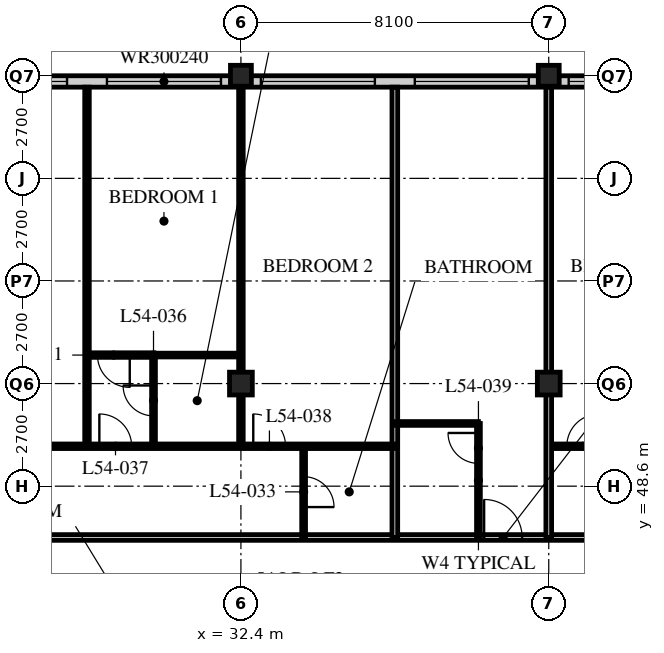
"""IFC4 building model, lengths in metres.
Left out: names, types, materials, properties, quantities, classifications, styles, units other than length and angle.
Written with IfcOpenShell. Run it as: python <this file> out.ifc"""

import sys

from ifc_helpers import new_model, si_unit, direction, frame, frame_2d, origin, origin_2d, place, context, subcontext, project, spatial, rectangle, hollow_rectangle, extrude, element, fill, save


model = new_model("IFC4")
c1 = context("Model", 3, precision=1e-05, world=origin(), true_north=direction((0.0, 1.0)))
c2 = subcontext(c1, "Body", "Model", "MODEL_VIEW")
j1 = project(units=[si_unit("LENGTHUNIT", "METRE"), si_unit("PLANEANGLEUNIT", "RADIAN")], contexts=[c1])
p1 = place(None, origin())
s1 = spatial("IfcSite", under=j1, at=p1, CompositionType="ELEMENT")
p2 = place(p1, origin())
s2 = spatial("IfcBuilding", under=s1, at=p2, CompositionType="ELEMENT")
p3 = place(p2, frame((0.0, 0.0, 210.0)))
s3 = spatial("IfcBuildingStorey", under=s2, at=p3, CompositionType="ELEMENT", Elevation=210.0)
p4 = place(p3, frame((32.4, 51.3, 0.0), z_axis=(0.0, 0.0, 1.0), x_axis=(1.0, 0.0, 0.0)))
e1 = element("IfcColumn", 1, at=p4, inside=s3, PredefinedType="COLUMN", context=c2, shape_type="SweptSolid", body=[
    extrude(hollow_rectangle(XDim=0.6, YDim=0.6, WallThickness=0.05, at=origin_2d()), origin(), (0.0, 0.0, 1.0), 3.6),
])
p5 = place(p3, frame((32.4, 59.4, 0.0), z_axis=(0.0, 0.0, 1.0), x_axis=(1.0, 0.0, 0.0)))
e2 = element("IfcColumn", 2, at=p5, inside=s3, PredefinedType="COLUMN", context=c2, shape_type="SweptSolid", body=[
    extrude(hollow_rectangle(XDim=0.55, YDim=0.55, WallThickness=0.045, at=origin_2d()), origin(), (0.0, 0.0, 1.0), 3.6),
])
p6 = place(p3, frame((40.5, 51.3, 0.0), z_axis=(0.0, 0.0, 1.0), x_axis=(1.0, 0.0, 0.0)))
e3 = element("IfcColumn", 3, at=p6, inside=s3, PredefinedType="COLUMN", context=c2, shape_type="SweptSolid", body=[
    extrude(hollow_rectangle(XDim=0.6, YDim=0.6, WallThickness=0.05, at=origin_2d()), origin(), (0.0, 0.0, 1.0), 3.6),
])
p7 = place(p3, frame((40.5, 59.4, 0.0), z_axis=(0.0, 0.0, 1.0), x_axis=(1.0, 0.0, 0.0)))
e4 = element("IfcColumn", 4, at=p7, inside=s3, PredefinedType="COLUMN", context=c2, shape_type="SweptSolid", body=[
    extrude(hollow_rectangle(XDim=0.55, YDim=0.55, WallThickness=0.045, at=origin_2d()), origin(), (0.0, 0.0, 1.0), 3.6),
])
p8 = place(p3, frame((48.3, 59.25, 0.0), z_axis=(0.0, 0.0, 1.0), x_axis=(-1.0, 0.0, 0.0)))
e5 = element("IfcWall", 5, at=p8, inside=s3, PredefinedType="SOLIDWALL", context=c2, shape_type="SweptSolid", body=[
    extrude(rectangle(XDim=40.2, YDim=0.3, at=frame_2d((20.1, 0.0))), origin(), (0.0, 0.0, 1.0), 3.39),
])
p9 = place(p8, frame((0.225, 0.0, 0.6)))
e6 = element("IfcOpeningElement", 6, at=p9, cuts=e5, PredefinedType="OPENING", context=c2, shape_type="SweptSolid", body=[
    extrude(rectangle(XDim=3.0, YDim=2.4, at=frame_2d((1.5, 1.2))), frame((0.0, 0.16, 0.0), z_axis=(0.0, -1.0, 0.0), x_axis=(1.0, 0.0, 0.0)), (0.0, 0.0, 1.0), 0.32),
])
p10 = place(p8, frame((4.275, 0.0, 0.6)))
e7 = element("IfcOpeningElement", 7, at=p10, cuts=e5, PredefinedType="OPENING", context=c2, shape_type="SweptSolid", body=[
    extrude(rectangle(XDim=3.0, YDim=2.4, at=frame_2d((1.5, 1.2))), frame((0.0, 0.16, 0.0), z_axis=(0.0, -1.0, 0.0), x_axis=(1.0, 0.0, 0.0)), (0.0, 0.0, 1.0), 0.32),
])
p11 = place(p8, frame((8.325, 0.0, 0.6)))
e8 = element("IfcOpeningElement", 8, at=p11, cuts=e5, PredefinedType="OPENING", context=c2, shape_type="SweptSolid", body=[
    extrude(rectangle(XDim=3.0, YDim=2.4, at=frame_2d((1.5, 1.2))), frame((0.0, 0.16, 0.0), z_axis=(0.0, -1.0, 0.0), x_axis=(1.0, 0.0, 0.0)), (0.0, 0.0, 1.0), 0.32),
])
p12 = place(p8, frame((12.375, 0.0, 0.6)))
e9 = element("IfcOpeningElement", 9, at=p12, cuts=e5, PredefinedType="OPENING", context=c2, shape_type="SweptSolid", body=[
    extrude(rectangle(XDim=3.0, YDim=2.4, at=frame_2d((1.5, 1.2))), frame((0.0, 0.16, 0.0), z_axis=(0.0, -1.0, 0.0), x_axis=(1.0, 0.0, 0.0)), (0.0, 0.0, 1.0), 0.32),
])
p13 = place(p8, frame((16.425, 0.0, 0.6)))
e10 = element("IfcOpeningElement", 10, at=p13, cuts=e5, PredefinedType="OPENING", context=c2, shape_type="SweptSolid", body=[
    extrude(rectangle(XDim=3.0, YDim=2.4, at=frame_2d((1.5, 1.2))), frame((0.0, 0.16, 0.0), z_axis=(0.0, -1.0, 0.0), x_axis=(1.0, 0.0, 0.0)), (0.0, 0.0, 1.0), 0.32),
])
p14 = place(p8, frame((20.475, 0.0, 0.6)))
e11 = element("IfcOpeningElement", 11, at=p14, cuts=e5, PredefinedType="OPENING", context=c2, shape_type="SweptSolid", body=[
    extrude(rectangle(XDim=3.0, YDim=2.4, at=frame_2d((1.5, 1.2))), frame((0.0, 0.16, 0.0), z_axis=(0.0, -1.0, 0.0), x_axis=(1.0, 0.0, 0.0)), (0.0, 0.0, 1.0), 0.32),
])
p15 = place(p8, frame((24.525, 0.0, 0.6)))
e12 = element("IfcOpeningElement", 12, at=p15, cuts=e5, PredefinedType="OPENING", context=c2, shape_type="SweptSolid", body=[
    extrude(rectangle(XDim=3.0, YDim=2.4, at=frame_2d((1.5, 1.2))), frame((0.0, 0.16, 0.0), z_axis=(0.0, -1.0, 0.0), x_axis=(1.0, 0.0, 0.0)), (0.0, 0.0, 1.0), 0.32),
])
p16 = place(p8, frame((28.575, 0.0, 0.6)))
e13 = element("IfcOpeningElement", 13, at=p16, cuts=e5, PredefinedType="OPENING", context=c2, shape_type="SweptSolid", body=[
    extrude(rectangle(XDim=3.0, YDim=2.4, at=frame_2d((1.5, 1.2))), frame((0.0, 0.16, 0.0), z_axis=(0.0, -1.0, 0.0), x_axis=(1.0, 0.0, 0.0)), (0.0, 0.0, 1.0), 0.32),
])
p17 = place(p8, frame((32.625, 0.0, 0.6)))
e14 = element("IfcOpeningElement", 14, at=p17, cuts=e5, PredefinedType="OPENING", context=c2, shape_type="SweptSolid", body=[
    extrude(rectangle(XDim=3.0, YDim=2.4, at=frame_2d((1.5, 1.2))), frame((0.0, 0.16, 0.0), z_axis=(0.0, -1.0, 0.0), x_axis=(1.0, 0.0, 0.0)), (0.0, 0.0, 1.0), 0.32),
])
p18 = place(p8, frame((36.675, 0.0, 0.6)))
e15 = element("IfcOpeningElement", 15, at=p18, cuts=e5, PredefinedType="OPENING", context=c2, shape_type="SweptSolid", body=[
    extrude(rectangle(XDim=3.0, YDim=2.4, at=frame_2d((1.5, 1.2))), frame((0.0, 0.16, 0.0), z_axis=(0.0, -1.0, 0.0), x_axis=(1.0, 0.0, 0.0)), (0.0, 0.0, 1.0), 0.32),
])
p19 = place(p3, frame((8.1, 47.25, 0.0), z_axis=(0.0, 0.0, 1.0), x_axis=(1.0, 0.0, 0.0)))
e16 = element("IfcWall", 16, at=p19, inside=s3, PredefinedType="PARTITIONING", context=c2, shape_type="SweptSolid", body=[
    extrude(rectangle(XDim=36.45, YDim=0.15, at=frame_2d((18.225, 0.0))), origin(), (0.0, 0.0, 1.0), 3.39),
])
p20 = place(p19, frame((4.45, 0.0, 0.0)))
e17 = element("IfcOpeningElement", 17, at=p20, cuts=e16, PredefinedType="OPENING", context=c2, shape_type="SweptSolid", body=[
    extrude(rectangle(XDim=1.0, YDim=2.1, at=frame_2d((0.5, 1.05))), frame((0.0, 0.085, 0.0), z_axis=(0.0, -1.0, 0.0), x_axis=(1.0, 0.0, 0.0)), (0.0, 0.0, 1.0), 0.17),
])
p21 = place(p19, frame((12.55, 0.0, 0.0)))
e18 = element("IfcOpeningElement", 18, at=p21, cuts=e16, PredefinedType="OPENING", context=c2, shape_type="SweptSolid", body=[
    extrude(rectangle(XDim=1.0, YDim=2.1, at=frame_2d((0.5, 1.05))), frame((0.0, 0.085, 0.0), z_axis=(0.0, -1.0, 0.0), x_axis=(1.0, 0.0, 0.0)), (0.0, 0.0, 1.0), 0.17),
])
p22 = place(p19, frame((30.7, 0.0, 0.0)))
e19 = element("IfcOpeningElement", 19, at=p22, cuts=e16, PredefinedType="OPENING", context=c2, shape_type="SweptSolid", body=[
    extrude(rectangle(XDim=1.0, YDim=2.1, at=frame_2d((0.5, 1.05))), frame((0.0, 0.085, 0.0), z_axis=(0.0, -1.0, 0.0), x_axis=(1.0, 0.0, 0.0)), (0.0, 0.0, 1.0), 0.17),
])
p23 = place(p19, frame((33.925, 0.0, 0.0)))
e20 = element("IfcOpeningElement", 20, at=p23, cuts=e16, PredefinedType="OPENING", context=c2, shape_type="SweptSolid", body=[
    extrude(rectangle(XDim=1.0, YDim=2.1, at=frame_2d((0.5, 1.05))), frame((0.0, 0.085, 0.0), z_axis=(0.0, -1.0, 0.0), x_axis=(1.0, 0.0, 0.0)), (0.0, 0.0, 1.0), 0.17),
])
p24 = place(p19, frame((1.525, 0.0, 0.0)))
e21 = element("IfcOpeningElement", 21, at=p24, cuts=e16, PredefinedType="OPENING", context=c2, shape_type="SweptSolid", body=[
    extrude(rectangle(XDim=1.0, YDim=2.1, at=frame_2d((0.5, 1.05))), frame((0.0, 0.085, 0.0), z_axis=(0.0, -1.0, 0.0), x_axis=(1.0, 0.0, 0.0)), (0.0, 0.0, 1.0), 0.17),
])
p25 = place(p3, frame((34.05, 47.25, 0.0), z_axis=(0.0, 0.0, 1.0), x_axis=(0.0, 1.0, 0.0)))
e22 = element("IfcWall", 22, at=p25, inside=s3, PredefinedType="PARTITIONING", context=c2, shape_type="SweptSolid", body=[
    extrude(rectangle(XDim=2.4, YDim=0.1, at=frame_2d((1.2, 0.0))), origin(), (0.0, 0.0, 1.0), 3.39),
])
p26 = place(p25, frame((0.8, 0.0, 0.0)))
e23 = element("IfcOpeningElement", 23, at=p26, cuts=e22, PredefinedType="OPENING", context=c2, shape_type="SweptSolid", body=[
    extrude(rectangle(XDim=0.8, YDim=2.1, at=frame_2d((0.4, 1.05))), frame((0.0, 0.06, 0.0), z_axis=(0.0, -1.0, 0.0), x_axis=(1.0, 0.0, 0.0)), (0.0, 0.0, 1.0), 0.12),
])
p27 = place(p3, frame((30.1, 49.65, 0.0), z_axis=(0.0, 0.0, 1.0), x_axis=(0.0, 1.0, 0.0)))
e24 = element("IfcWall", 24, at=p27, inside=s3, PredefinedType="PARTITIONING", context=c2, shape_type="SweptSolid", body=[
    extrude(rectangle(XDim=2.4, YDim=0.1, at=frame_2d((1.2, 0.0))), origin(), (0.0, 0.0, 1.0), 3.39),
])
p28 = place(p27, frame((0.8, 0.0, 0.0)))
e25 = element("IfcOpeningElement", 25, at=p28, cuts=e24, PredefinedType="OPENING", context=c2, shape_type="SweptSolid", body=[
    extrude(rectangle(XDim=0.8, YDim=2.1, at=frame_2d((0.4, 1.05))), frame((0.0, 0.06, 0.0), z_axis=(0.0, -1.0, 0.0), x_axis=(1.0, 0.0, 0.0)), (0.0, 0.0, 1.0), 0.12),
])
p29 = place(p3, frame((30.1, 52.05, 0.0), z_axis=(0.0, 0.0, 1.0), x_axis=(1.0, 0.0, 0.0)))
e26 = element("IfcWall", 26, at=p29, inside=s3, PredefinedType="PARTITIONING", context=c2, shape_type="SweptSolid", body=[
    extrude(rectangle(XDim=2.3, YDim=0.1, at=frame_2d((1.15, 0.0))), origin(), (0.0, 0.0, 1.0), 3.39),
])
p30 = place(p3, frame((28.35, 49.65, 0.0), z_axis=(0.0, 0.0, 1.0), x_axis=(0.0, 1.0, 0.0)))
e27 = element("IfcWall", 27, at=p30, inside=s3, PredefinedType="PARTITIONING", context=c2, shape_type="SweptSolid", body=[
    extrude(rectangle(XDim=9.45, YDim=0.12, at=frame_2d((4.725, 0.0))), origin(), (0.0, 0.0, 1.0), 3.39),
])
p31 = place(p3, frame((32.4, 49.65, 0.0), z_axis=(0.0, 0.0, 1.0), x_axis=(0.0, 1.0, 0.0)))
e28 = element("IfcWall", 28, at=p31, inside=s3, PredefinedType="PARTITIONING", context=c2, shape_type="SweptSolid", body=[
    extrude(rectangle(XDim=9.45, YDim=0.12, at=frame_2d((4.725, 0.0))), origin(), (0.0, 0.0, 1.0), 2.778),
])
p32 = place(p3, frame((36.45, 47.25, 0.0), z_axis=(0.0, 0.0, 1.0), x_axis=(0.0, 1.0, 0.0)))
e29 = element("IfcWall", 29, at=p32, inside=s3, PredefinedType="PARTITIONING", context=c2, shape_type="SweptSolid", body=[
    extrude(rectangle(XDim=11.85, YDim=0.15, at=frame_2d((5.925, 0.0))), origin(), (0.0, 0.0, 1.0), 3.39),
])
p33 = place(p3, frame((36.45, 50.25, 0.0), z_axis=(0.0, 0.0, 1.0), x_axis=(1.0, 0.0, 0.0)))
e30 = element("IfcWall", 30, at=p33, inside=s3, PredefinedType="PARTITIONING", context=c2, shape_type="SweptSolid", body=[
    extrude(rectangle(XDim=2.2, YDim=0.1, at=frame_2d((1.1, 0.0))), origin(), (0.0, 0.0, 1.0), 3.39),
])
p34 = place(p3, frame((38.65, 47.25, 0.0), z_axis=(0.0, 0.0, 1.0), x_axis=(0.0, 1.0, 0.0)))
e31 = element("IfcWall", 31, at=p34, inside=s3, PredefinedType="PARTITIONING", context=c2, shape_type="SweptSolid", body=[
    extrude(rectangle(XDim=3.0, YDim=0.1, at=frame_2d((1.5, 0.0))), origin(), (0.0, 0.0, 1.0), 3.39),
])
p35 = place(p34, frame((1.95, 0.0, 0.0)))
e32 = element("IfcOpeningElement", 32, at=p35, cuts=e31, PredefinedType="OPENING", context=c2, shape_type="SweptSolid", body=[
    extrude(rectangle(XDim=0.8, YDim=2.1, at=frame_2d((0.4, 1.05))), frame((0.0, 0.06, 0.0), z_axis=(0.0, -1.0, 0.0), x_axis=(1.0, 0.0, 0.0)), (0.0, 0.0, 1.0), 0.12),
])
p36 = place(p3, frame((40.5, 49.65, 0.0), z_axis=(0.0, 0.0, 1.0), x_axis=(1.0, 0.0, 0.0)))
e33 = element("IfcWall", 33, at=p36, inside=s3, PredefinedType="PARTITIONING", context=c2, shape_type="SweptSolid", body=[
    extrude(rectangle(XDim=8.05, YDim=0.12, at=frame_2d((4.025, 0.0))), origin(), (0.0, 0.0, 1.0), 3.39),
])
p37 = place(p36, frame((0.475, 0.0, 0.0)))
e34 = element("IfcOpeningElement", 34, at=p37, cuts=e33, PredefinedType="OPENING", context=c2, shape_type="SweptSolid", body=[
    extrude(rectangle(XDim=0.85, YDim=2.1, at=frame_2d((0.425, 1.05))), frame((0.0, 0.07, 0.0), z_axis=(0.0, -1.0, 0.0), x_axis=(1.0, 0.0, 0.0)), (0.0, 0.0, 1.0), 0.14),
])
p38 = place(p36, frame((4.325, 0.0, 0.0)))
e35 = element("IfcOpeningElement", 35, at=p38, cuts=e33, PredefinedType="OPENING", context=c2, shape_type="SweptSolid", body=[
    extrude(rectangle(XDim=0.85, YDim=2.1, at=frame_2d((0.425, 1.05))), frame((0.0, 0.07, 0.0), z_axis=(0.0, -1.0, 0.0), x_axis=(1.0, 0.0, 0.0)), (0.0, 0.0, 1.0), 0.14),
])
p39 = place(p3, frame((40.5, 47.25, 0.0), z_axis=(0.0, 0.0, 1.0), x_axis=(0.0, 1.0, 0.0)))
e36 = element("IfcWall", 36, at=p39, inside=s3, PredefinedType="PARTITIONING", context=c2, shape_type="SweptSolid", body=[
    extrude(rectangle(XDim=11.85, YDim=0.15, at=frame_2d((5.925, 0.0))), origin(), (0.0, 0.0, 1.0), 2.778),
])
p40 = place(p3, frame((4.1, 49.65, 0.0), z_axis=(0.0, 0.0, 1.0), x_axis=(1.0, 0.0, 0.0)))
e37 = element("IfcWall", 37, at=p40, inside=s3, PredefinedType="PARTITIONING", context=c2, shape_type="SweptSolid", body=[
    extrude(rectangle(XDim=32.35, YDim=0.12, at=frame_2d((16.175, 0.0))), origin(), (0.0, 0.0, 1.0), 3.39),
])
p41 = place(p40, frame((9.025, 0.0, 0.0)))
e38 = element("IfcOpeningElement", 38, at=p41, cuts=e37, PredefinedType="OPENING", context=c2, shape_type="SweptSolid", body=[
    extrude(rectangle(XDim=0.85, YDim=2.1, at=frame_2d((0.425, 1.05))), frame((0.0, 0.07, 0.0), z_axis=(0.0, -1.0, 0.0), x_axis=(1.0, 0.0, 0.0)), (0.0, 0.0, 1.0), 0.14),
])
p42 = place(p40, frame((12.425, 0.0, 0.0)))
e39 = element("IfcOpeningElement", 39, at=p42, cuts=e37, PredefinedType="OPENING", context=c2, shape_type="SweptSolid", body=[
    extrude(rectangle(XDim=0.85, YDim=2.1, at=frame_2d((0.425, 1.05))), frame((0.0, 0.07, 0.0), z_axis=(0.0, -1.0, 0.0), x_axis=(1.0, 0.0, 0.0)), (0.0, 0.0, 1.0), 0.14),
])
p43 = place(p40, frame((17.125, 0.0, 0.0)))
e40 = element("IfcOpeningElement", 40, at=p43, cuts=e37, PredefinedType="OPENING", context=c2, shape_type="SweptSolid", body=[
    extrude(rectangle(XDim=0.85, YDim=2.1, at=frame_2d((0.425, 1.05))), frame((0.0, 0.07, 0.0), z_axis=(0.0, -1.0, 0.0), x_axis=(1.0, 0.0, 0.0)), (0.0, 0.0, 1.0), 0.14),
])
p44 = place(p40, frame((24.575, 0.0, 0.0)))
e41 = element("IfcOpeningElement", 41, at=p44, cuts=e37, PredefinedType="OPENING", context=c2, shape_type="SweptSolid", body=[
    extrude(rectangle(XDim=0.85, YDim=2.1, at=frame_2d((0.425, 1.05))), frame((0.0, 0.07, 0.0), z_axis=(0.0, -1.0, 0.0), x_axis=(1.0, 0.0, 0.0)), (0.0, 0.0, 1.0), 0.14),
])
p45 = place(p40, frame((28.625, 0.0, 0.0)))
e42 = element("IfcOpeningElement", 42, at=p45, cuts=e37, PredefinedType="OPENING", context=c2, shape_type="SweptSolid", body=[
    extrude(rectangle(XDim=0.85, YDim=2.1, at=frame_2d((0.425, 1.05))), frame((0.0, 0.07, 0.0), z_axis=(0.0, -1.0, 0.0), x_axis=(1.0, 0.0, 0.0)), (0.0, 0.0, 1.0), 0.14),
])
p46 = place(p40, frame((6.725, 0.0, 0.0)))
e43 = element("IfcOpeningElement", 43, at=p46, cuts=e37, PredefinedType="OPENING", context=c2, shape_type="SweptSolid", body=[
    extrude(rectangle(XDim=0.85, YDim=2.1, at=frame_2d((0.425, 1.05))), frame((0.0, 0.07, 0.0), z_axis=(0.0, -1.0, 0.0), x_axis=(1.0, 0.0, 0.0)), (0.0, 0.0, 1.0), 0.14),
])
p47 = place(p40, frame((2.875, 0.0, 0.0)))
e44 = element("IfcOpeningElement", 44, at=p47, cuts=e37, PredefinedType="OPENING", context=c2, shape_type="SweptSolid", body=[
    extrude(rectangle(XDim=0.85, YDim=2.1, at=frame_2d((0.425, 1.05))), frame((0.0, 0.07, 0.0), z_axis=(0.0, -1.0, 0.0), x_axis=(1.0, 0.0, 0.0)), (0.0, 0.0, 1.0), 0.14),
])
p48 = place(p3, frame((28.35, 52.05, 0.0), z_axis=(0.0, 0.0, 1.0), x_axis=(1.0, 0.0, 0.0)))
e45 = element("IfcWall", 45, at=p48, inside=s3, PredefinedType="PARTITIONING", context=c2, shape_type="SweptSolid", body=[
    extrude(rectangle(XDim=1.76, YDim=0.12, at=frame_2d((0.88, 0.0))), origin(), (0.0, 0.0, 1.0), 3.39),
])
p49 = place(p48, frame((0.275, 0.0, 0.0)))
e46 = element("IfcOpeningElement", 46, at=p49, cuts=e45, PredefinedType="OPENING", context=c2, shape_type="SweptSolid", body=[
    extrude(rectangle(XDim=0.85, YDim=2.1, at=frame_2d((0.425, 1.05))), frame((0.0, 0.07, 0.0), z_axis=(0.0, -1.0, 0.0), x_axis=(1.0, 0.0, 0.0)), (0.0, 0.0, 1.0), 0.14),
])
p50 = place(p10, origin())
e47 = element("IfcWindow", 47, at=p50, inside=s3, PartitioningType="SINGLE_PANEL", PredefinedType="WINDOW", context=c2, shape_type="SweptSolid", body=[
    extrude(rectangle(XDim=3.0, YDim=2.4, at=frame_2d((1.5, 1.2))), frame((0.0, 0.03, 0.0), z_axis=(0.0, -1.0, 0.0), x_axis=(1.0, 0.0, 0.0)), (0.0, 0.0, 1.0), 0.06),
])
fill(e7, e47)
p51 = place(p11, origin())
e48 = element("IfcWindow", 48, at=p51, inside=s3, PartitioningType="SINGLE_PANEL", PredefinedType="WINDOW", context=c2, shape_type="SweptSolid", body=[
    extrude(rectangle(XDim=3.0, YDim=2.4, at=frame_2d((1.5, 1.2))), frame((0.0, 0.03, 0.0), z_axis=(0.0, -1.0, 0.0), x_axis=(1.0, 0.0, 0.0)), (0.0, 0.0, 1.0), 0.06),
])
fill(e8, e48)
p52 = place(p12, origin())
e49 = element("IfcWindow", 49, at=p52, inside=s3, PartitioningType="SINGLE_PANEL", PredefinedType="WINDOW", context=c2, shape_type="SweptSolid", body=[
    extrude(rectangle(XDim=3.0, YDim=2.4, at=frame_2d((1.5, 1.2))), frame((0.0, 0.03, 0.0), z_axis=(0.0, -1.0, 0.0), x_axis=(1.0, 0.0, 0.0)), (0.0, 0.0, 1.0), 0.06),
])
fill(e9, e49)
p53 = place(p13, origin())
e50 = element("IfcWindow", 50, at=p53, inside=s3, PartitioningType="SINGLE_PANEL", PredefinedType="WINDOW", context=c2, shape_type="SweptSolid", body=[
    extrude(rectangle(XDim=3.0, YDim=2.4, at=frame_2d((1.5, 1.2))), frame((0.0, 0.03, 0.0), z_axis=(0.0, -1.0, 0.0), x_axis=(1.0, 0.0, 0.0)), (0.0, 0.0, 1.0), 0.06),
])
fill(e10, e50)
p54 = place(p14, origin())
e51 = element("IfcWindow", 51, at=p54, inside=s3, PartitioningType="SINGLE_PANEL", PredefinedType="WINDOW", context=c2, shape_type="SweptSolid", body=[
    extrude(rectangle(XDim=3.0, YDim=2.4, at=frame_2d((1.5, 1.2))), frame((0.0, 0.03, 0.0), z_axis=(0.0, -1.0, 0.0), x_axis=(1.0, 0.0, 0.0)), (0.0, 0.0, 1.0), 0.06),
])
fill(e11, e51)
p55 = place(p26, origin())
e52 = element("IfcDoor", 52, at=p55, inside=s3, OperationType="SINGLE_SWING_RIGHT", PredefinedType="DOOR", context=c2, shape_type="SweptSolid", body=[
    extrude(rectangle(XDim=0.8, YDim=2.1, at=frame_2d((0.4, 1.05))), frame((0.0, 0.025, 0.0), z_axis=(0.0, -1.0, 0.0), x_axis=(1.0, 0.0, 0.0)), (0.0, 0.0, 1.0), 0.05),
])
fill(e23, e52)
p56 = place(p28, origin())
e53 = element("IfcDoor", 53, at=p56, inside=s3, OperationType="SINGLE_SWING_RIGHT", PredefinedType="DOOR", context=c2, shape_type="SweptSolid", body=[
    extrude(rectangle(XDim=0.8, YDim=2.1, at=frame_2d((0.4, 1.05))), frame((0.0, 0.025, 0.0), z_axis=(0.0, -1.0, 0.0), x_axis=(1.0, 0.0, 0.0)), (0.0, 0.0, 1.0), 0.05),
])
fill(e25, e53)
p57 = place(p44, origin())
e54 = element("IfcDoor", 54, at=p57, inside=s3, OperationType="SINGLE_SWING_LEFT", PredefinedType="DOOR", context=c2, shape_type="SweptSolid", body=[
    extrude(rectangle(XDim=0.85, YDim=2.1, at=frame_2d((0.425, 1.05))), frame((0.0, 0.025, 0.0), z_axis=(0.0, -1.0, 0.0), x_axis=(1.0, 0.0, 0.0)), (0.0, 0.0, 1.0), 0.05),
])
fill(e41, e54)
p58 = place(p45, origin())
e55 = element("IfcDoor", 55, at=p58, inside=s3, OperationType="SINGLE_SWING_LEFT", PredefinedType="DOOR", context=c2, shape_type="SweptSolid", body=[
    extrude(rectangle(XDim=0.85, YDim=2.1, at=frame_2d((0.425, 1.05))), frame((0.0, 0.025, 0.0), z_axis=(0.0, -1.0, 0.0), x_axis=(1.0, 0.0, 0.0)), (0.0, 0.0, 1.0), 0.05),
])
fill(e42, e55)
p59 = place(p35, origin())
e56 = element("IfcDoor", 56, at=p59, inside=s3, OperationType="SINGLE_SWING_RIGHT", PredefinedType="DOOR", context=c2, shape_type="SweptSolid", body=[
    extrude(rectangle(XDim=0.8, YDim=2.1, at=frame_2d((0.4, 1.05))), frame((0.0, 0.025, 0.0), z_axis=(0.0, -1.0, 0.0), x_axis=(1.0, 0.0, 0.0)), (0.0, 0.0, 1.0), 0.05),
])
fill(e32, e56)
p60 = place(p22, origin())
e57 = element("IfcDoor", 57, at=p60, inside=s3, OperationType="SINGLE_SWING_LEFT", PredefinedType="DOOR", context=c2, shape_type="SweptSolid", body=[
    extrude(rectangle(XDim=1.0, YDim=2.1, at=frame_2d((0.5, 1.05))), frame((0.0, 0.025, 0.0), z_axis=(0.0, -1.0, 0.0), x_axis=(1.0, 0.0, 0.0)), (0.0, 0.0, 1.0), 0.05),
])
fill(e19, e57)
p61 = place(p37, origin())
e58 = element("IfcDoor", 58, at=p61, inside=s3, OperationType="SINGLE_SWING_RIGHT", PredefinedType="DOOR", context=c2, shape_type="SweptSolid", body=[
    extrude(rectangle(XDim=0.85, YDim=2.1, at=frame_2d((0.425, 1.05))), frame((0.0, 0.025, 0.0), z_axis=(0.0, -1.0, 0.0), x_axis=(1.0, 0.0, 0.0)), (0.0, 0.0, 1.0), 0.05),
])
fill(e34, e58)
p62 = place(p49, origin())
e59 = element("IfcDoor", 59, at=p62, inside=s3, OperationType="SINGLE_SWING_LEFT", PredefinedType="DOOR", context=c2, shape_type="SweptSolid", body=[
    extrude(rectangle(XDim=0.85, YDim=2.1, at=frame_2d((0.425, 1.05))), frame((0.0, 0.025, 0.0), z_axis=(0.0, -1.0, 0.0), x_axis=(1.0, 0.0, 0.0)), (0.0, 0.0, 1.0), 0.05),
])
fill(e46, e59)
save(model, sys.argv[1])
